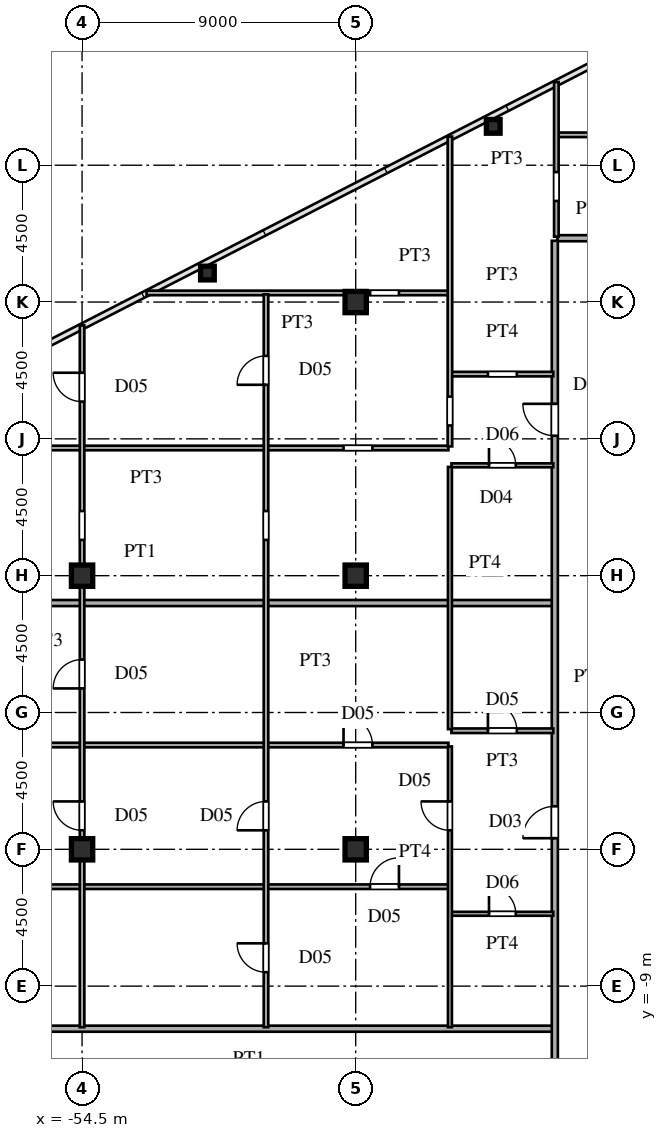
"""IFC4 building model, lengths in metres.
Left out: names, types, materials, properties, quantities, classifications, styles, units other than length and angle.
Written with IfcOpenShell. Run it as: python <this file> out.ifc"""

import sys

from ifc_helpers import new_model, si_unit, direction, frame, frame_2d, origin, origin_2d, place, context, subcontext, project, spatial, rectangle, hollow_rectangle, i_section, extrude, source, transform, mapped, element, fill, save


model = new_model("IFC4")
c1 = context("Model", 3, precision=1e-05, world=origin(), true_north=direction((0.0, 1.0)))
c2 = subcontext(c1, "Body", "Model", "MODEL_VIEW")
j1 = project(units=[si_unit("LENGTHUNIT", "METRE"), si_unit("PLANEANGLEUNIT", "RADIAN")], contexts=[c1])
p1 = place(None, origin())
s1 = spatial("IfcSite", under=j1, at=p1, CompositionType="ELEMENT")
p2 = place(p1, origin())
s2 = spatial("IfcBuilding", under=s1, at=p2, CompositionType="ELEMENT")
p3 = place(p2, frame((0.0, 0.0, 121.2)))
s3 = spatial("IfcBuildingStorey", under=s2, at=p3, CompositionType="ELEMENT", Elevation=121.2)
m1 = source(origin(), c2, "Body", "SweptSolid", [
    extrude(i_section(OverallWidth=0.7, OverallDepth=0.7, WebThickness=0.028, FlangeThickness=0.045, at=origin_2d()), origin(), (0.0, 0.0, 1.0), 3.6),
])
for number, where, z_axis, x_axis in (
    (1, (-45.5, -4.5, 0.0), (0.0, 0.0, 1.0), (1.0, 0.0, 0.0)),
    (2, (-45.5, 4.5, 0.0), (0.0, 0.0, 1.0), (1.0, 0.0, 0.0)),
    (3, (-45.5, 13.5, 0.0), (0.0, 0.0, 1.0), (1.0, 0.0, 0.0)),
    (4, (-54.5, -4.5, 0.0), (0.0, 0.0, 1.0), (1.0, 0.0, 0.0)),
    (5, (-54.5, 4.5, 0.0), (0.0, 0.0, 1.0), (1.0, 0.0, 0.0)),
):
    element("IfcColumn", number, at=place(p3, frame(where, z_axis=z_axis, x_axis=x_axis)), inside=s3, PredefinedType="COLUMN", context=c2, shape_type="MappedRepresentation", body=[
        mapped(m1, transform((0.0, 0.0, 0.0), scale=1.0)),
    ])
m2 = source(origin(), c2, "Body", "SweptSolid", [
    extrude(hollow_rectangle(XDim=0.45, YDim=0.45, WallThickness=0.018, at=origin_2d()), origin(), (0.0, 0.0, 1.0), 3.6),
])
for number, where, z_axis, x_axis in (
    (6, (-40.976, 19.278, 0.0), (0.0, 0.0, 1.0), (1.0, 0.0, 0.0)),
    (7, (-50.377, 14.453, 0.0), (0.0, 0.0, 1.0), (1.0, 0.0, 0.0)),
):
    element("IfcColumn", number, at=place(p3, frame(where, z_axis=z_axis, x_axis=x_axis)), inside=s3, PredefinedType="COLUMN", context=c2, shape_type="MappedRepresentation", body=[
        mapped(m2, transform((0.0, 0.0, 0.0), scale=1.0)),
    ])
p4 = place(p3, frame((-58.988, -10.4, 0.0), z_axis=(0.0, 0.0, 1.0), x_axis=(1.0, 0.0, 0.0)))
e8 = element("IfcWall", 8, at=p4, inside=s3, PredefinedType="PARTITIONING", context=c2, shape_type="SweptSolid", body=[
    extrude(rectangle(XDim=19.958, YDim=0.2, at=frame_2d((9.979, 0.0))), origin(), (0.0, 0.0, 1.0), 3.38),
])
p5 = place(p3, frame((-42.35, -6.62, 0.0), z_axis=(0.0, 0.0, 1.0), x_axis=(1.0, 0.0, 0.0)))
e9 = element("IfcWall", 9, at=p5, inside=s3, PredefinedType="PARTITIONING", context=c2, shape_type="SweptSolid", body=[
    extrude(rectangle(XDim=3.35, YDim=0.13, at=frame_2d((1.675, 0.0))), origin(), (0.0, 0.0, 1.0), 3.38),
])
p6 = place(p5, frame((1.235, 0.0, 0.0)))
e10 = element("IfcOpeningElement", 10, at=p6, cuts=e9, PredefinedType="OPENING", context=c2, shape_type="SweptSolid", body=[
    extrude(rectangle(XDim=0.88, YDim=2.1, at=frame_2d((0.44, 1.05))), frame((0.0, 0.075, 0.0), z_axis=(0.0, -1.0, 0.0), x_axis=(1.0, 0.0, 0.0)), (0.0, 0.0, 1.0), 0.15),
])
p7 = place(p3, frame((-68.106, -5.73, 0.0), z_axis=(0.0, 0.0, 1.0), x_axis=(1.0, 0.0, 0.0)))
e11 = element("IfcWall", 11, at=p7, inside=s3, PredefinedType="PARTITIONING", context=c2, shape_type="SweptSolid", body=[
    extrude(rectangle(XDim=25.656, YDim=0.15, at=frame_2d((12.828, 0.0))), origin(), (0.0, 0.0, 1.0), 3.38),
])
p8 = place(p7, frame((23.079, 0.0, 0.0)))
e12 = element("IfcOpeningElement", 12, at=p8, cuts=e11, PredefinedType="OPENING", context=c2, shape_type="SweptSolid", body=[
    extrude(rectangle(XDim=0.95, YDim=2.15, at=frame_2d((0.475, 1.075))), frame((0.0, 0.085, 0.0), z_axis=(0.0, -1.0, 0.0), x_axis=(1.0, 0.0, 0.0)), (0.0, 0.0, 1.0), 0.17),
])
p9 = place(p7, frame((10.281, 0.0, 0.0)))
e13 = element("IfcOpeningElement", 13, at=p9, cuts=e11, PredefinedType="OPENING", context=c2, shape_type="SweptSolid", body=[
    extrude(rectangle(XDim=0.95, YDim=2.15, at=frame_2d((0.475, 1.075))), frame((0.0, 0.085, 0.0), z_axis=(0.0, -1.0, 0.0), x_axis=(1.0, 0.0, 0.0)), (0.0, 0.0, 1.0), 0.17),
])
p10 = place(p3, frame((-69.535, -1.07, 0.0), z_axis=(0.0, 0.0, 1.0), x_axis=(1.0, 0.0, 0.0)))
e14 = element("IfcWall", 14, at=p10, inside=s3, PredefinedType="PARTITIONING", context=c2, shape_type="SweptSolid", body=[
    extrude(rectangle(XDim=27.085, YDim=0.15, at=frame_2d((13.542, 0.0))), origin(), (0.0, 0.0, 1.0), 3.38),
])
p11 = place(p10, frame((23.635, 0.0, 0.0)))
e15 = element("IfcOpeningElement", 15, at=p11, cuts=e14, PredefinedType="OPENING", context=c2, shape_type="SweptSolid", body=[
    extrude(rectangle(XDim=0.95, YDim=2.15, at=frame_2d((0.475, 1.075))), frame((0.0, 0.085, 0.0), z_axis=(0.0, -1.0, 0.0), x_axis=(1.0, 0.0, 0.0)), (0.0, 0.0, 1.0), 0.17),
])
p12 = place(p10, frame((11.71, 0.0, 0.0)))
e16 = element("IfcOpeningElement", 16, at=p12, cuts=e14, PredefinedType="OPENING", context=c2, shape_type="SweptSolid", body=[
    extrude(rectangle(XDim=0.95, YDim=2.15, at=frame_2d((0.475, 1.075))), frame((0.0, 0.085, 0.0), z_axis=(0.0, -1.0, 0.0), x_axis=(1.0, 0.0, 0.0)), (0.0, 0.0, 1.0), 0.17),
])
p13 = place(p3, frame((-42.35, -0.6, 0.0), z_axis=(0.0, 0.0, 1.0), x_axis=(1.0, 0.0, 0.0)))
e17 = element("IfcWall", 17, at=p13, inside=s3, PredefinedType="PARTITIONING", context=c2, shape_type="SweptSolid", body=[
    extrude(rectangle(XDim=3.35, YDim=0.15, at=frame_2d((1.675, 0.0))), origin(), (0.0, 0.0, 1.0), 3.38),
])
p14 = place(p13, frame((1.2, 0.0, 0.0)))
e18 = element("IfcOpeningElement", 18, at=p14, cuts=e17, PredefinedType="OPENING", context=c2, shape_type="SweptSolid", body=[
    extrude(rectangle(XDim=0.95, YDim=2.15, at=frame_2d((0.475, 1.075))), frame((0.0, 0.085, 0.0), z_axis=(0.0, -1.0, 0.0), x_axis=(1.0, 0.0, 0.0)), (0.0, 0.0, 1.0), 0.17),
])
p15 = place(p3, frame((-69.505, 3.6, 0.0), z_axis=(0.0, 0.0, 1.0), x_axis=(1.0, 0.0, 0.0)))
e19 = element("IfcWall", 19, at=p15, inside=s3, PredefinedType="PARTITIONING", context=c2, shape_type="SweptSolid", body=[
    extrude(rectangle(XDim=30.475, YDim=0.2, at=frame_2d((15.237, 0.0))), origin(), (0.0, 0.0, 1.0), 3.38),
])
p16 = place(p3, frame((-42.35, 8.13, 0.0), z_axis=(0.0, 0.0, 1.0), x_axis=(1.0, 0.0, 0.0)))
e20 = element("IfcWall", 20, at=p16, inside=s3, PredefinedType="PARTITIONING", context=c2, shape_type="SweptSolid", body=[
    extrude(rectangle(XDim=3.35, YDim=0.13, at=frame_2d((1.675, 0.0))), origin(), (0.0, 0.0, 1.0), 3.38),
])
p17 = place(p16, frame((1.235, 0.0, 0.0)))
e21 = element("IfcOpeningElement", 21, at=p17, cuts=e20, PredefinedType="OPENING", context=c2, shape_type="SweptSolid", body=[
    extrude(rectangle(XDim=0.88, YDim=2.1, at=frame_2d((0.44, 1.05))), frame((0.0, 0.075, 0.0), z_axis=(0.0, -1.0, 0.0), x_axis=(1.0, 0.0, 0.0)), (0.0, 0.0, 1.0), 0.15),
])
p18 = place(p3, frame((-62.321, 8.7, 0.0), z_axis=(0.0, 0.0, 1.0), x_axis=(1.0, 0.0, 0.0)))
e22 = element("IfcWall", 22, at=p18, inside=s3, PredefinedType="PARTITIONING", context=c2, shape_type="SweptSolid", body=[
    extrude(rectangle(XDim=19.871, YDim=0.15, at=frame_2d((9.936, 0.0))), origin(), (0.0, 0.0, 1.0), 3.38),
])
p19 = place(p18, frame((16.421, 0.0, 0.0)))
e23 = element("IfcOpeningElement", 23, at=p19, cuts=e22, PredefinedType="OPENING", context=c2, shape_type="SweptSolid", body=[
    extrude(rectangle(XDim=0.95, YDim=2.15, at=frame_2d((0.475, 1.075))), frame((0.0, 0.085, 0.0), z_axis=(0.0, -1.0, 0.0), x_axis=(1.0, 0.0, 0.0)), (0.0, 0.0, 1.0), 0.17),
])
p20 = place(p3, frame((-42.35, 11.13, 0.0), z_axis=(0.0, 0.0, 1.0), x_axis=(1.0, 0.0, 0.0)))
e24 = element("IfcWall", 24, at=p20, inside=s3, PredefinedType="PARTITIONING", context=c2, shape_type="SweptSolid", body=[
    extrude(rectangle(XDim=3.35, YDim=0.15, at=frame_2d((1.675, 0.0))), origin(), (0.0, 0.0, 1.0), 3.38),
])
p21 = place(p20, frame((1.2, 0.0, 0.0)))
e25 = element("IfcOpeningElement", 25, at=p21, cuts=e24, PredefinedType="OPENING", context=c2, shape_type="SweptSolid", body=[
    extrude(rectangle(XDim=0.95, YDim=2.15, at=frame_2d((0.475, 1.075))), frame((0.0, 0.085, 0.0), z_axis=(0.0, -1.0, 0.0), x_axis=(1.0, 0.0, 0.0)), (0.0, 0.0, 1.0), 0.17),
])
p22 = place(p3, frame((-52.378, 13.8, 0.0), z_axis=(0.0, 0.0, 1.0), x_axis=(1.0, 0.0, 0.0)))
e26 = element("IfcWall", 26, at=p22, inside=s3, PredefinedType="PARTITIONING", context=c2, shape_type="SweptSolid", body=[
    extrude(rectangle(XDim=9.928, YDim=0.15, at=frame_2d((4.964, 0.0))), origin(), (0.0, 0.0, 1.0), 2.78),
])
p23 = place(p22, frame((7.351, 0.0, 0.0)))
e27 = element("IfcOpeningElement", 27, at=p23, cuts=e26, PredefinedType="OPENING", context=c2, shape_type="SweptSolid", body=[
    extrude(rectangle(XDim=0.95, YDim=2.15, at=frame_2d((0.475, 1.075))), frame((0.0, 0.085, 0.0), z_axis=(0.0, -1.0, 0.0), x_axis=(1.0, 0.0, 0.0)), (0.0, 0.0, 1.0), 0.17),
])
p24 = place(p3, frame((-38.865, 15.6, 0.0), z_axis=(0.0, 0.0, 1.0), x_axis=(1.0, 0.0, 0.0)))
e28 = element("IfcWall", 28, at=p24, inside=s3, PredefinedType="PARTITIONING", context=c2, shape_type="SweptSolid", body=[
    extrude(rectangle(XDim=2.28, YDim=0.2, at=frame_2d((1.14, 0.0))), origin(), (0.0, 0.0, 1.0), 3.38),
])
p25 = place(p3, frame((-38.85, 19.0, 0.0), z_axis=(0.0, 0.0, 1.0), x_axis=(1.0, 0.0, 0.0)))
e29 = element("IfcWall", 29, at=p25, inside=s3, PredefinedType="PARTITIONING", context=c2, shape_type="SweptSolid", body=[
    extrude(rectangle(XDim=11.385, YDim=0.15, at=frame_2d((5.692, 0.0))), origin(), (0.0, 0.0, 1.0), 3.38),
])
p26 = place(p25, frame((5.175, 0.0, 0.0)))
e30 = element("IfcOpeningElement", 30, at=p26, cuts=e29, PredefinedType="OPENING", context=c2, shape_type="SweptSolid", body=[
    extrude(rectangle(XDim=0.95, YDim=2.15, at=frame_2d((0.475, 1.075))), frame((0.0, 0.085, 0.0), z_axis=(0.0, -1.0, 0.0), x_axis=(1.0, 0.0, 0.0)), (0.0, 0.0, 1.0), 0.17),
])
p27 = place(p3, frame((-54.5, -10.35, 0.0), z_axis=(0.0, 0.0, 1.0), x_axis=(0.0, 1.0, 0.0)))
e31 = element("IfcWall", 31, at=p27, inside=s3, PredefinedType="PARTITIONING", context=c2, shape_type="SweptSolid", body=[
    extrude(rectangle(XDim=23.082, YDim=0.15, at=frame_2d((11.541, 0.0))), origin(), (0.0, 0.0, 1.0), 2.78),
])
p28 = place(p27, frame((6.475, 0.0, 0.0)))
e32 = element("IfcOpeningElement", 32, at=p28, cuts=e31, PredefinedType="OPENING", context=c2, shape_type="SweptSolid", body=[
    extrude(rectangle(XDim=0.95, YDim=2.15, at=frame_2d((0.475, 1.075))), frame((0.0, 0.085, 0.0), z_axis=(0.0, -1.0, 0.0), x_axis=(1.0, 0.0, 0.0)), (0.0, 0.0, 1.0), 0.17),
])
p29 = place(p27, frame((11.142, 0.0, 0.0)))
e33 = element("IfcOpeningElement", 33, at=p29, cuts=e31, PredefinedType="OPENING", context=c2, shape_type="SweptSolid", body=[
    extrude(rectangle(XDim=0.95, YDim=2.15, at=frame_2d((0.475, 1.075))), frame((0.0, 0.085, 0.0), z_axis=(0.0, -1.0, 0.0), x_axis=(1.0, 0.0, 0.0)), (0.0, 0.0, 1.0), 0.17),
])
p30 = place(p27, frame((20.575, 0.0, 0.0)))
e34 = element("IfcOpeningElement", 34, at=p30, cuts=e31, PredefinedType="OPENING", context=c2, shape_type="SweptSolid", body=[
    extrude(rectangle(XDim=0.95, YDim=2.15, at=frame_2d((0.475, 1.075))), frame((0.0, 0.085, 0.0), z_axis=(0.0, -1.0, 0.0), x_axis=(1.0, 0.0, 0.0)), (0.0, 0.0, 1.0), 0.17),
])
p31 = place(p27, frame((16.026, 0.0, 0.0)))
e35 = element("IfcOpeningElement", 35, at=p31, cuts=e31, PredefinedType="OPENING", context=c2, shape_type="SweptSolid", body=[
    extrude(rectangle(XDim=0.95, YDim=2.15, at=frame_2d((0.475, 1.075))), frame((0.0, 0.085, 0.0), z_axis=(0.0, -1.0, 0.0), x_axis=(1.0, 0.0, 0.0)), (0.0, 0.0, 1.0), 0.17),
])
p32 = place(p3, frame((-48.45, -10.35, 0.0), z_axis=(0.0, 0.0, 1.0), x_axis=(0.0, 1.0, 0.0)))
e36 = element("IfcWall", 36, at=p32, inside=s3, PredefinedType="PARTITIONING", context=c2, shape_type="SweptSolid", body=[
    extrude(rectangle(XDim=24.104, YDim=0.15, at=frame_2d((12.052, 0.0))), origin(), (0.0, 0.0, 1.0), 3.38),
])
p33 = place(p32, frame((6.475, 0.0, 0.0)))
e37 = element("IfcOpeningElement", 37, at=p33, cuts=e36, PredefinedType="OPENING", context=c2, shape_type="SweptSolid", body=[
    extrude(rectangle(XDim=0.95, YDim=2.15, at=frame_2d((0.475, 1.075))), frame((0.0, 0.085, 0.0), z_axis=(0.0, -1.0, 0.0), x_axis=(1.0, 0.0, 0.0)), (0.0, 0.0, 1.0), 0.17),
])
p34 = place(p32, frame((1.808, 0.0, 0.0)))
e38 = element("IfcOpeningElement", 38, at=p34, cuts=e36, PredefinedType="OPENING", context=c2, shape_type="SweptSolid", body=[
    extrude(rectangle(XDim=0.95, YDim=2.15, at=frame_2d((0.475, 1.075))), frame((0.0, 0.085, 0.0), z_axis=(0.0, -1.0, 0.0), x_axis=(1.0, 0.0, 0.0)), (0.0, 0.0, 1.0), 0.17),
])
p35 = place(p32, frame((21.128, 0.0, 0.0)))
e39 = element("IfcOpeningElement", 39, at=p35, cuts=e36, PredefinedType="OPENING", context=c2, shape_type="SweptSolid", body=[
    extrude(rectangle(XDim=0.95, YDim=2.15, at=frame_2d((0.475, 1.075))), frame((0.0, 0.085, 0.0), z_axis=(0.0, -1.0, 0.0), x_axis=(1.0, 0.0, 0.0)), (0.0, 0.0, 1.0), 0.17),
])
p36 = place(p32, frame((16.026, 0.0, 0.0)))
e40 = element("IfcOpeningElement", 40, at=p36, cuts=e36, PredefinedType="OPENING", context=c2, shape_type="SweptSolid", body=[
    extrude(rectangle(XDim=0.95, YDim=2.15, at=frame_2d((0.475, 1.075))), frame((0.0, 0.085, 0.0), z_axis=(0.0, -1.0, 0.0), x_axis=(1.0, 0.0, 0.0)), (0.0, 0.0, 1.0), 0.17),
])
p37 = place(p3, frame((-42.4, -10.35, 0.0), z_axis=(0.0, 0.0, 1.0), x_axis=(0.0, 1.0, 0.0)))
e41 = element("IfcWall", 41, at=p37, inside=s3, PredefinedType="PARTITIONING", context=c2, shape_type="SweptSolid", body=[
    extrude(rectangle(XDim=9.233, YDim=0.13, at=frame_2d((4.617, 0.0))), origin(), (0.0, 0.0, 1.0), 3.38),
])
p38 = place(p37, frame((6.475, 0.0, 0.0)))
e42 = element("IfcOpeningElement", 42, at=p38, cuts=e41, PredefinedType="OPENING", context=c2, shape_type="SweptSolid", body=[
    extrude(rectangle(XDim=0.95, YDim=2.15, at=frame_2d((0.475, 1.075))), frame((0.0, 0.075, 0.0), z_axis=(0.0, -1.0, 0.0), x_axis=(1.0, 0.0, 0.0)), (0.0, 0.0, 1.0), 0.15),
])
p39 = place(p3, frame((-42.4, -0.548, 0.0), z_axis=(0.0, 0.0, 1.0), x_axis=(0.0, 1.0, 0.0)))
e43 = element("IfcWall", 43, at=p39, inside=s3, PredefinedType="PARTITIONING", context=c2, shape_type="SweptSolid", body=[
    extrude(rectangle(XDim=8.625, YDim=0.13, at=frame_2d((4.312, 0.0))), origin(), (0.0, 0.0, 1.0), 3.38),
])
p40 = place(p3, frame((-42.4, 8.752, 0.0), z_axis=(0.0, 0.0, 1.0), x_axis=(0.0, 1.0, 0.0)))
e44 = element("IfcWall", 44, at=p40, inside=s3, PredefinedType="PARTITIONING", context=c2, shape_type="SweptSolid", body=[
    extrude(rectangle(XDim=10.19, YDim=0.15, at=frame_2d((5.095, 0.0))), origin(), (0.0, 0.0, 1.0), 3.38),
])
p41 = place(p40, frame((0.688, 0.0, 0.0)))
e45 = element("IfcOpeningElement", 45, at=p41, cuts=e44, PredefinedType="OPENING", context=c2, shape_type="SweptSolid", body=[
    extrude(rectangle(XDim=0.95, YDim=2.15, at=frame_2d((0.475, 1.075))), frame((0.0, 0.085, 0.0), z_axis=(0.0, -1.0, 0.0), x_axis=(1.0, 0.0, 0.0)), (0.0, 0.0, 1.0), 0.17),
])
p42 = place(p3, frame((-38.95, -15.515, 0.0), z_axis=(0.0, 0.0, 1.0), x_axis=(0.0, 1.0, 0.0)))
e46 = element("IfcWall", 46, at=p42, inside=s3, PredefinedType="PARTITIONING", context=c2, shape_type="SweptSolid", body=[
    extrude(rectangle(XDim=31.03, YDim=0.2, at=frame_2d((15.515, 0.0))), origin(), (0.0, 0.0, 1.0), 3.38),
])
p43 = place(p42, frame((1.99, 0.0, 0.0)))
e47 = element("IfcOpeningElement", 47, at=p43, cuts=e46, PredefinedType="OPENING", context=c2, shape_type="SweptSolid", body=[
    extrude(rectangle(XDim=1.05, YDim=2.25, at=frame_2d((0.525, 1.125))), frame((0.0, 0.11, 0.0), z_axis=(0.0, -1.0, 0.0), x_axis=(1.0, 0.0, 0.0)), (0.0, 0.0, 1.0), 0.22),
])
p44 = place(p42, frame((11.38, 0.0, 0.0)))
e48 = element("IfcOpeningElement", 48, at=p44, cuts=e46, PredefinedType="OPENING", context=c2, shape_type="SweptSolid", body=[
    extrude(rectangle(XDim=1.05, YDim=2.25, at=frame_2d((0.525, 1.125))), frame((0.0, 0.11, 0.0), z_axis=(0.0, -1.0, 0.0), x_axis=(1.0, 0.0, 0.0)), (0.0, 0.0, 1.0), 0.22),
])
p45 = place(p42, frame((24.617, 0.0, 0.0)))
e49 = element("IfcOpeningElement", 49, at=p45, cuts=e46, PredefinedType="OPENING", context=c2, shape_type="SweptSolid", body=[
    extrude(rectangle(XDim=1.05, YDim=2.25, at=frame_2d((0.525, 1.125))), frame((0.0, 0.11, 0.0), z_axis=(0.0, -1.0, 0.0), x_axis=(1.0, 0.0, 0.0)), (0.0, 0.0, 1.0), 0.22),
])
p46 = place(p3, frame((-38.9, 15.65, 0.0), z_axis=(0.0, 0.0, 1.0), x_axis=(0.0, 1.0, 0.0)))
e50 = element("IfcWall", 50, at=p46, inside=s3, PredefinedType="PARTITIONING", context=c2, shape_type="SweptSolid", body=[
    extrude(rectangle(XDim=5.088, YDim=0.15, at=frame_2d((2.544, 0.0))), origin(), (0.0, 0.0, 1.0), 3.38),
])
p47 = place(p46, frame((1.175, 0.0, 0.0)))
e51 = element("IfcOpeningElement", 51, at=p47, cuts=e50, PredefinedType="OPENING", context=c2, shape_type="SweptSolid", body=[
    extrude(rectangle(XDim=0.95, YDim=2.15, at=frame_2d((0.475, 1.075))), frame((0.0, 0.085, 0.0), z_axis=(0.0, -1.0, 0.0), x_axis=(1.0, 0.0, 0.0)), (0.0, 0.0, 1.0), 0.17),
])
m3 = source(origin(), c2, "Body", "SweptSolid", [
    extrude(rectangle(XDim=0.88, YDim=2.1, at=frame_2d((0.44, 1.05))), frame((0.0, 0.025, 0.0), z_axis=(0.0, -1.0, 0.0), x_axis=(1.0, 0.0, 0.0)), (0.0, 0.0, 1.0), 0.05),
])
p48 = place(p6, origin())
e52 = element("IfcDoor", 52, at=p48, inside=s3, OperationType="SINGLE_SWING_LEFT", PredefinedType="DOOR", context=c2, shape_type="MappedRepresentation", body=[
    mapped(m3, transform((0.0, 0.0, 0.0), scale=1.0)),
])
fill(e10, e52)
m4 = source(origin(), c2, "Body", "SweptSolid", [
    extrude(rectangle(XDim=0.95, YDim=2.15, at=frame_2d((0.475, 1.075))), frame((0.0, 0.025, 0.0), z_axis=(0.0, -1.0, 0.0), x_axis=(1.0, 0.0, 0.0)), (0.0, 0.0, 1.0), 0.05),
])
p49 = place(p8, origin())
e53 = element("IfcDoor", 53, at=p49, inside=s3, OperationType="SINGLE_SWING_RIGHT", PredefinedType="DOOR", context=c2, shape_type="MappedRepresentation", body=[
    mapped(m4, transform((0.0, 0.0, 0.0), scale=1.0)),
])
fill(e12, e53)
p50 = place(p11, origin())
e54 = element("IfcDoor", 54, at=p50, inside=s3, OperationType="SINGLE_SWING_LEFT", PredefinedType="DOOR", context=c2, shape_type="MappedRepresentation", body=[
    mapped(m4, transform((0.0, 0.0, 0.0), scale=1.0)),
])
fill(e15, e54)
p51 = place(p14, origin())
e55 = element("IfcDoor", 55, at=p51, inside=s3, OperationType="SINGLE_SWING_LEFT", PredefinedType="DOOR", context=c2, shape_type="MappedRepresentation", body=[
    mapped(m4, transform((0.0, 0.0, 0.0), scale=1.0)),
])
fill(e18, e55)
p52 = place(p17, origin())
e56 = element("IfcDoor", 56, at=p52, inside=s3, OperationType="SINGLE_SWING_LEFT", PredefinedType="DOOR", context=c2, shape_type="MappedRepresentation", body=[
    mapped(m3, transform((0.0, 0.0, 0.0), scale=1.0)),
])
fill(e21, e56)
p53 = place(p28, origin())
e57 = element("IfcDoor", 57, at=p53, inside=s3, OperationType="SINGLE_SWING_RIGHT", PredefinedType="DOOR", context=c2, shape_type="MappedRepresentation", body=[
    mapped(m4, transform((0.0, 0.0, 0.0), scale=1.0)),
])
fill(e32, e57)
p54 = place(p29, origin())
e58 = element("IfcDoor", 58, at=p54, inside=s3, OperationType="SINGLE_SWING_LEFT", PredefinedType="DOOR", context=c2, shape_type="MappedRepresentation", body=[
    mapped(m4, transform((0.0, 0.0, 0.0), scale=1.0)),
])
fill(e33, e58)
p55 = place(p30, origin())
e59 = element("IfcDoor", 59, at=p55, inside=s3, OperationType="SINGLE_SWING_RIGHT", PredefinedType="DOOR", context=c2, shape_type="MappedRepresentation", body=[
    mapped(m4, transform((0.0, 0.0, 0.0), scale=1.0)),
])
fill(e34, e59)
p56 = place(p33, origin())
e60 = element("IfcDoor", 60, at=p56, inside=s3, OperationType="SINGLE_SWING_LEFT", PredefinedType="DOOR", context=c2, shape_type="MappedRepresentation", body=[
    mapped(m4, transform((0.0, 0.0, 0.0), scale=1.0)),
])
fill(e37, e60)
p57 = place(p34, origin())
e61 = element("IfcDoor", 61, at=p57, inside=s3, OperationType="SINGLE_SWING_RIGHT", PredefinedType="DOOR", context=c2, shape_type="MappedRepresentation", body=[
    mapped(m4, transform((0.0, 0.0, 0.0), scale=1.0)),
])
fill(e38, e61)
p58 = place(p35, origin())
e62 = element("IfcDoor", 62, at=p58, inside=s3, OperationType="SINGLE_SWING_LEFT", PredefinedType="DOOR", context=c2, shape_type="MappedRepresentation", body=[
    mapped(m4, transform((0.0, 0.0, 0.0), scale=1.0)),
])
fill(e39, e62)
p59 = place(p38, origin())
e63 = element("IfcDoor", 63, at=p59, inside=s3, OperationType="SINGLE_SWING_RIGHT", PredefinedType="DOOR", context=c2, shape_type="MappedRepresentation", body=[
    mapped(m4, transform((0.0, 0.0, 0.0), scale=1.0)),
])
fill(e42, e63)
m5 = source(origin(), c2, "Body", "SweptSolid", [
    extrude(rectangle(XDim=1.05, YDim=2.25, at=frame_2d((0.525, 1.125))), frame((0.0, 0.025, 0.0), z_axis=(0.0, -1.0, 0.0), x_axis=(1.0, 0.0, 0.0)), (0.0, 0.0, 1.0), 0.05),
])
p60 = place(p44, origin())
e64 = element("IfcDoor", 64, at=p60, inside=s3, OperationType="SINGLE_SWING_LEFT", PredefinedType="DOOR", context=c2, shape_type="MappedRepresentation", body=[
    mapped(m5, transform((0.0, 0.0, 0.0), scale=1.0)),
])
fill(e48, e64)
p61 = place(p45, origin())
e65 = element("IfcDoor", 65, at=p61, inside=s3, OperationType="SINGLE_SWING_RIGHT", PredefinedType="DOOR", context=c2, shape_type="MappedRepresentation", body=[
    mapped(m5, transform((0.0, 0.0, 0.0), scale=1.0)),
])
fill(e49, e65)
save(model, sys.argv[1])
